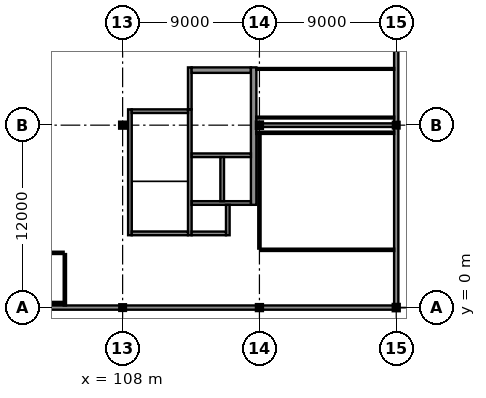
"""IFC4 building model, lengths in metres.
Left out: names, types, materials, properties, quantities, classifications, styles, units other than length and angle.
Written with IfcOpenShell. Run it as: python <this file> out.ifc"""

import sys

from ifc_helpers import new_model, si_unit, direction, frame, frame_2d, origin, origin_2d, place, context, subcontext, project, spatial, rectangle, i_section, extrude, element, fill, save


model = new_model("IFC4")
c1 = context("Model", 3, precision=1e-05, world=origin(), true_north=direction((0.0, 1.0)))
c2 = subcontext(c1, "Body", "Model", "MODEL_VIEW")
j1 = project(units=[si_unit("LENGTHUNIT", "METRE"), si_unit("PLANEANGLEUNIT", "RADIAN")], contexts=[c1])
p1 = place(None, origin())
s1 = spatial("IfcSite", under=j1, at=p1, CompositionType="ELEMENT")
p2 = place(p1, origin())
s2 = spatial("IfcBuilding", under=s1, at=p2, CompositionType="ELEMENT")
p3 = place(p2, frame((0.0, 0.0, 27.4)))
s3 = spatial("IfcBuildingStorey", under=s2, at=p3, CompositionType="ELEMENT", Elevation=27.4)
p4 = place(p3, frame((108.0, 0.0, 0.0), z_axis=(0.0, 0.0, 1.0), x_axis=(1.0, 0.0, 0.0)))
e1 = element("IfcColumn", 1, at=p4, inside=s3, PredefinedType="COLUMN", context=c2, shape_type="SweptSolid", body=[
    extrude(i_section(OverallWidth=0.28, OverallDepth=0.28, WebThickness=0.01, FlangeThickness=0.018, at=origin_2d()), origin(), (0.0, 0.0, 1.0), 4.0),
])
for number, where, z_axis, x_axis in (
    (2, (108.0, 12.0, 0.0), (0.0, 0.0, 1.0), (1.0, 0.0, 0.0)),
    (3, (117.0, 0.0, 0.0), (0.0, 0.0, 1.0), (1.0, 0.0, 0.0)),
):
    element("IfcColumn", number, at=place(p3, frame(where, z_axis=z_axis, x_axis=x_axis)), inside=s3, PredefinedType="COLUMN", context=c2, shape_type="SweptSolid", body=[
        extrude(i_section(OverallWidth=0.3, OverallDepth=0.3, WebThickness=0.011, FlangeThickness=0.019, at=origin_2d()), origin(), (0.0, 0.0, 1.0), 4.0),
    ])
for number, where, z_axis, x_axis in (
    (4, (117.0, 12.0, 0.0), (0.0, 0.0, 1.0), (0.0, 1.0, 0.0)),
    (5, (126.0, 0.0, 0.0), (0.0, 0.0, 1.0), (1.0, 0.0, 0.0)),
):
    element("IfcColumn", number, at=place(p3, frame(where, z_axis=z_axis, x_axis=x_axis)), inside=s3, PredefinedType="COLUMN", context=c2, shape_type="SweptSolid", body=[
        extrude(i_section(OverallWidth=0.3, OverallDepth=0.32, WebThickness=0.011, FlangeThickness=0.021, at=origin_2d()), origin(), (0.0, 0.0, 1.0), 4.0),
    ])
p5 = place(p3, frame((126.0, 12.0, 0.0), z_axis=(0.0, 0.0, 1.0), x_axis=(1.0, 0.0, 0.0)))
e6 = element("IfcColumn", 6, at=p5, inside=s3, PredefinedType="COLUMN", context=c2, shape_type="SweptSolid", body=[
    extrude(i_section(OverallWidth=0.28, OverallDepth=0.28, WebThickness=0.01, FlangeThickness=0.018, at=origin_2d()), origin(), (0.0, 0.0, 1.0), 4.0),
])
p6 = place(p3, frame((99.058, 0.0, 0.0), z_axis=(0.0, 0.0, 1.0), x_axis=(1.0, 0.0, 0.0)))
e7 = element("IfcWall", 7, at=p6, inside=s3, PredefinedType="SOLIDWALL", context=c2, shape_type="SweptSolid", body=[
    extrude(rectangle(XDim=8.934, YDim=0.28, at=frame_2d((4.467, 0.0))), origin(), (0.0, 0.0, 1.0), 2.885),
])
p7 = place(p6, frame((2.03, 0.0, 1.05)))
e8 = element("IfcOpeningElement", 8, at=p7, cuts=e7, PredefinedType="OPENING", context=c2, shape_type="SweptSolid", body=[
    extrude(rectangle(XDim=1.3, YDim=1.3, at=frame_2d((0.65, 0.65))), frame((0.0, 0.155, 0.0), z_axis=(0.0, -1.0, 0.0), x_axis=(1.0, 0.0, 0.0)), (0.0, 0.0, 1.0), 0.31),
])
p8 = place(p6, frame((5.604, 0.0, 1.05)))
e9 = element("IfcOpeningElement", 9, at=p8, cuts=e7, PredefinedType="OPENING", context=c2, shape_type="SweptSolid", body=[
    extrude(rectangle(XDim=1.3, YDim=1.3, at=frame_2d((0.65, 0.65))), frame((0.0, 0.155, 0.0), z_axis=(0.0, -1.0, 0.0), x_axis=(1.0, 0.0, 0.0)), (0.0, 0.0, 1.0), 0.31),
])
p9 = place(p3, frame((108.008, 0.0, 0.0), z_axis=(0.0, 0.0, 1.0), x_axis=(1.0, 0.0, 0.0)))
e10 = element("IfcWall", 10, at=p9, inside=s3, PredefinedType="SOLIDWALL", context=c2, shape_type="SweptSolid", body=[
    extrude(rectangle(XDim=8.984, YDim=0.28, at=frame_2d((4.492, 0.0))), origin(), (0.0, 0.0, 1.0), 2.885),
])
p10 = place(p9, frame((2.045, 0.0, 1.05)))
e11 = element("IfcOpeningElement", 11, at=p10, cuts=e10, PredefinedType="OPENING", context=c2, shape_type="SweptSolid", body=[
    extrude(rectangle(XDim=1.3, YDim=1.3, at=frame_2d((0.65, 0.65))), frame((0.0, 0.155, 0.0), z_axis=(0.0, -1.0, 0.0), x_axis=(1.0, 0.0, 0.0)), (0.0, 0.0, 1.0), 0.31),
])
p11 = place(p9, frame((5.639, 0.0, 1.05)))
e12 = element("IfcOpeningElement", 12, at=p11, cuts=e10, PredefinedType="OPENING", context=c2, shape_type="SweptSolid", body=[
    extrude(rectangle(XDim=1.3, YDim=1.3, at=frame_2d((0.65, 0.65))), frame((0.0, 0.155, 0.0), z_axis=(0.0, -1.0, 0.0), x_axis=(1.0, 0.0, 0.0)), (0.0, 0.0, 1.0), 0.31),
])
p12 = place(p3, frame((117.008, 0.0, 0.0), z_axis=(0.0, 0.0, 1.0), x_axis=(1.0, 0.0, 0.0)))
e13 = element("IfcWall", 13, at=p12, inside=s3, PredefinedType="SOLIDWALL", context=c2, shape_type="SweptSolid", body=[
    extrude(rectangle(XDim=8.984, YDim=0.28, at=frame_2d((4.492, 0.0))), origin(), (0.0, 0.0, 1.0), 2.885),
])
p13 = place(p12, frame((2.045, 0.0, 1.05)))
e14 = element("IfcOpeningElement", 14, at=p13, cuts=e13, PredefinedType="OPENING", context=c2, shape_type="SweptSolid", body=[
    extrude(rectangle(XDim=1.3, YDim=1.3, at=frame_2d((0.65, 0.65))), frame((0.0, 0.155, 0.0), z_axis=(0.0, -1.0, 0.0), x_axis=(1.0, 0.0, 0.0)), (0.0, 0.0, 1.0), 0.31),
])
p14 = place(p12, frame((5.639, 0.0, 1.05)))
e15 = element("IfcOpeningElement", 15, at=p14, cuts=e13, PredefinedType="OPENING", context=c2, shape_type="SweptSolid", body=[
    extrude(rectangle(XDim=1.3, YDim=1.3, at=frame_2d((0.65, 0.65))), frame((0.0, 0.155, 0.0), z_axis=(0.0, -1.0, 0.0), x_axis=(1.0, 0.0, 0.0)), (0.0, 0.0, 1.0), 0.31),
])
p15 = place(p3, frame((126.0, 0.158, 0.0), z_axis=(0.0, 0.0, 1.0), x_axis=(0.0, 1.0, 0.0)))
e16 = element("IfcWall", 16, at=p15, inside=s3, PredefinedType="SOLIDWALL", context=c2, shape_type="SweptSolid", body=[
    extrude(rectangle(XDim=11.704, YDim=0.28, at=frame_2d((5.852, 0.0))), origin(), (0.0, 0.0, 1.0), 3.305),
])
p16 = place(p15, frame((6.842, 0.0, 0.0)))
e17 = element("IfcOpeningElement", 17, at=p16, cuts=e16, PredefinedType="OPENING", context=c2, shape_type="SweptSolid", body=[
    extrude(rectangle(XDim=1.2, YDim=2.3, at=frame_2d((0.6, 1.15))), frame((0.0, 0.155, 0.0), z_axis=(0.0, -1.0, 0.0), x_axis=(1.0, 0.0, 0.0)), (0.0, 0.0, 1.0), 0.31),
])
p17 = place(p3, frame((126.0, 12.138, 0.0), z_axis=(0.0, 0.0, 1.0), x_axis=(0.0, 1.0, 0.0)))
e18 = element("IfcWall", 18, at=p17, inside=s3, PredefinedType="SOLIDWALL", context=c2, shape_type="SweptSolid", body=[
    extrude(rectangle(XDim=11.589, YDim=0.28, at=frame_2d((5.794, 0.0))), origin(), (0.0, 0.0, 1.0), 3.305),
])
p18 = place(p17, frame((2.022, 0.0, 1.05)))
e19 = element("IfcOpeningElement", 19, at=p18, cuts=e18, PredefinedType="OPENING", context=c2, shape_type="SweptSolid", body=[
    extrude(rectangle(XDim=1.3, YDim=1.3, at=frame_2d((0.65, 0.65))), frame((0.0, 0.155, 0.0), z_axis=(0.0, -1.0, 0.0), x_axis=(1.0, 0.0, 0.0)), (0.0, 0.0, 1.0), 0.31),
])
p19 = place(p17, frame((7.462, 0.0, 1.05)))
e20 = element("IfcOpeningElement", 20, at=p19, cuts=e18, PredefinedType="OPENING", context=c2, shape_type="SweptSolid", body=[
    extrude(rectangle(XDim=1.3, YDim=1.3, at=frame_2d((0.65, 0.65))), frame((0.0, 0.155, 0.0), z_axis=(0.0, -1.0, 0.0), x_axis=(1.0, 0.0, 0.0)), (0.0, 0.0, 1.0), 0.31),
])
p20 = place(p3, frame((108.48, 4.76, 0.0), z_axis=(0.0, 0.0, 1.0), x_axis=(0.0, 1.0, 0.0)))
e21 = element("IfcWall", 21, at=p20, inside=s3, PredefinedType="SHEAR", context=c2, shape_type="SweptSolid", body=[
    extrude(rectangle(XDim=8.28, YDim=0.24, at=frame_2d((4.14, 0.0))), origin(), (0.0, 0.0, 1.0), 3.81),
])
p21 = place(p3, frame((112.42, 4.76, 0.0), z_axis=(0.0, 0.0, 1.0), x_axis=(0.0, 1.0, 0.0)))
e22 = element("IfcWall", 22, at=p21, inside=s3, PredefinedType="SHEAR", context=c2, shape_type="SweptSolid", body=[
    extrude(rectangle(XDim=8.28, YDim=0.24, at=frame_2d((4.14, 0.0))), origin(), (0.0, 0.0, 1.0), 3.81),
])
p22 = place(p21, frame((6.49, 0.0, 0.0)))
e23 = element("IfcOpeningElement", 23, at=p22, cuts=e22, PredefinedType="OPENING", context=c2, shape_type="SweptSolid", body=[
    extrude(rectangle(XDim=1.3, YDim=2.2, at=frame_2d((0.65, 1.1))), frame((0.0, 0.135, 0.0), z_axis=(0.0, -1.0, 0.0), x_axis=(1.0, 0.0, 0.0)), (0.0, 0.0, 1.0), 0.27),
])
for number, where, z_axis, x_axis in (
    (24, (108.6, 4.88, 0.0), (0.0, 0.0, 1.0), (1.0, 0.0, 0.0)),
    (25, (108.6, 12.92, 0.0), (0.0, 0.0, 1.0), (1.0, 0.0, 0.0)),
):
    element("IfcWall", number, at=place(p3, frame(where, z_axis=z_axis, x_axis=x_axis)), inside=s3, PredefinedType="SHEAR", context=c2, shape_type="SweptSolid", body=[
        extrude(rectangle(XDim=3.7, YDim=0.24, at=frame_2d((1.85, 0.0))), origin(), (0.0, 0.0, 1.0), 3.81),
    ])
p23 = place(p3, frame((112.42, 13.04, 0.0), z_axis=(0.0, 0.0, 1.0), x_axis=(0.0, 1.0, 0.0)))
e26 = element("IfcWall", 26, at=p23, inside=s3, PredefinedType="SHEAR", context=c2, shape_type="SweptSolid", body=[
    extrude(rectangle(XDim=2.76, YDim=0.24, at=frame_2d((1.38, 0.0))), origin(), (0.0, 0.0, 1.0), 3.66),
])
p24 = place(p3, frame((112.54, 15.62, 0.0), z_axis=(0.0, 0.0, 1.0), x_axis=(1.0, 0.0, 0.0)))
e27 = element("IfcWall", 27, at=p24, inside=s3, PredefinedType="SHEAR", context=c2, shape_type="SweptSolid", body=[
    extrude(rectangle(XDim=3.9, YDim=0.36, at=frame_2d((1.95, 0.0))), origin(), (0.0, 0.0, 1.0), 3.66),
])
p25 = place(p24, frame((1.15, 0.0, 0.0)))
e28 = element("IfcOpeningElement", 28, at=p25, cuts=e27, PredefinedType="OPENING", context=c2, shape_type="SweptSolid", body=[
    extrude(rectangle(XDim=1.6, YDim=2.25, at=frame_2d((0.8, 1.125))), frame((0.0, 0.195, 0.0), z_axis=(0.0, -1.0, 0.0), x_axis=(1.0, 0.0, 0.0)), (0.0, 0.0, 1.0), 0.39),
])
p26 = place(p3, frame((116.62, 6.76, 0.0), z_axis=(0.0, 0.0, 1.0), x_axis=(0.0, 1.0, 0.0)))
e29 = element("IfcWall", 29, at=p26, inside=s3, PredefinedType="SHEAR", context=c2, shape_type="SweptSolid", body=[
    extrude(rectangle(XDim=9.04, YDim=0.36, at=frame_2d((4.52, 0.0))), origin(), (0.0, 0.0, 1.0), 3.66),
])
p27 = place(p3, frame((112.54, 10.02, 0.0), z_axis=(0.0, 0.0, 1.0), x_axis=(1.0, 0.0, 0.0)))
e30 = element("IfcWall", 30, at=p27, inside=s3, PredefinedType="SHEAR", context=c2, shape_type="SweptSolid", body=[
    extrude(rectangle(XDim=3.9, YDim=0.24, at=frame_2d((1.95, 0.0))), origin(), (0.0, 0.0, 1.0), 3.81),
])
p28 = place(p27, frame((0.235, 0.0, 0.0)))
e31 = element("IfcOpeningElement", 31, at=p28, cuts=e30, PredefinedType="OPENING", context=c2, shape_type="SweptSolid", body=[
    extrude(rectangle(XDim=1.6, YDim=2.3, at=frame_2d((0.8, 1.15))), frame((0.0, 0.135, 0.0), z_axis=(0.0, -1.0, 0.0), x_axis=(1.0, 0.0, 0.0)), (0.0, 0.0, 1.0), 0.27),
])
p29 = place(p27, frame((2.185, 0.0, 0.0)))
e32 = element("IfcOpeningElement", 32, at=p29, cuts=e30, PredefinedType="OPENING", context=c2, shape_type="SweptSolid", body=[
    extrude(rectangle(XDim=1.6, YDim=2.3, at=frame_2d((0.8, 1.15))), frame((0.0, 0.135, 0.0), z_axis=(0.0, -1.0, 0.0), x_axis=(1.0, 0.0, 0.0)), (0.0, 0.0, 1.0), 0.27),
])
p30 = place(p3, frame((112.54, 6.88, 0.0), z_axis=(0.0, 0.0, 1.0), x_axis=(1.0, 0.0, 0.0)))
e33 = element("IfcWall", 33, at=p30, inside=s3, PredefinedType="SHEAR", context=c2, shape_type="SweptSolid", body=[
    extrude(rectangle(XDim=3.9, YDim=0.24, at=frame_2d((1.95, 0.0))), origin(), (0.0, 0.0, 1.0), 3.81),
])
p31 = place(p3, frame((114.55, 7.0, 0.0), z_axis=(0.0, 0.0, 1.0), x_axis=(0.0, 1.0, 0.0)))
e34 = element("IfcWall", 34, at=p31, inside=s3, PredefinedType="SHEAR", context=c2, shape_type="SweptSolid", body=[
    extrude(rectangle(XDim=2.9, YDim=0.24, at=frame_2d((1.45, 0.0))), origin(), (0.0, 0.0, 1.0), 3.81),
])
p32 = place(p3, frame((114.92, 4.76, 0.0), z_axis=(0.0, 0.0, 1.0), x_axis=(0.0, 1.0, 0.0)))
e35 = element("IfcWall", 35, at=p32, inside=s3, PredefinedType="SHEAR", context=c2, shape_type="SweptSolid", body=[
    extrude(rectangle(XDim=2.0, YDim=0.24, at=frame_2d((1.0, 0.0))), origin(), (0.0, 0.0, 1.0), 3.81),
])
p33 = place(p3, frame((112.54, 4.88, 0.0), z_axis=(0.0, 0.0, 1.0), x_axis=(1.0, 0.0, 0.0)))
e36 = element("IfcWall", 36, at=p33, inside=s3, PredefinedType="SHEAR", context=c2, shape_type="SweptSolid", body=[
    extrude(rectangle(XDim=2.26, YDim=0.24, at=frame_2d((1.13, 0.0))), origin(), (0.0, 0.0, 1.0), 3.81),
])
p34 = place(p3, frame((117.158, 12.0, 0.0), z_axis=(0.0, 0.0, 1.0), x_axis=(1.0, 0.0, 0.0)))
e37 = element("IfcWall", 37, at=p34, inside=s3, PredefinedType="SHEAR", context=c2, shape_type="SweptSolid", body=[
    extrude(rectangle(XDim=8.834, YDim=0.24, at=frame_2d((4.417, 0.0))), origin(), (0.0, 0.0, 1.0), 3.355),
])
p35 = place(p3, frame((45.88, 3.6, 0.0), z_axis=(0.0, 0.0, 1.0), x_axis=(1.0, 0.0, 0.0)))
e38 = element("IfcWall", 38, at=p35, inside=s3, PredefinedType="PARTITIONING", context=c2, shape_type="SweptSolid", body=[
    extrude(rectangle(XDim=58.24, YDim=0.15, at=frame_2d((29.12, 0.0))), origin(), (0.0, 0.0, 1.0), 3.64),
])
p36 = place(p35, frame((27.795, 0.0, 0.0)))
e39 = element("IfcOpeningElement", 39, at=p36, cuts=e38, PredefinedType="OPENING", context=c2, shape_type="SweptSolid", body=[
    extrude(rectangle(XDim=1.05, YDim=2.25, at=frame_2d((0.525, 1.125))), frame((0.0, 0.09, 0.0), z_axis=(0.0, -1.0, 0.0), x_axis=(1.0, 0.0, 0.0)), (0.0, 0.0, 1.0), 0.18),
])
p37 = place(p3, frame((104.2, 3.52, 0.0), z_axis=(0.0, 0.0, 1.0), x_axis=(0.0, -1.0, 0.0)))
e40 = element("IfcWall", 40, at=p37, inside=s3, PredefinedType="PARTITIONING", context=c2, shape_type="SweptSolid", body=[
    extrude(rectangle(XDim=3.385, YDim=0.15, at=frame_2d((1.692, 0.0))), origin(), (0.0, 0.0, 1.0), 3.64),
])
p38 = place(p3, frame((104.13, 0.3, 0.0), z_axis=(0.0, 0.0, 1.0), x_axis=(-1.0, 0.0, 0.0)))
e41 = element("IfcWall", 41, at=p38, inside=s3, PredefinedType="PARTITIONING", context=c2, shape_type="SweptSolid", body=[
    extrude(rectangle(XDim=31.851, YDim=0.15, at=frame_2d((15.925, 0.0))), origin(), (0.0, 0.0, 1.0), 3.64),
])
p39 = place(p3, frame((125.865, 3.8, 0.0), z_axis=(0.0, 0.0, 1.0), x_axis=(-1.0, 0.0, 0.0)))
e42 = element("IfcWall", 42, at=p39, inside=s3, PredefinedType="PARTITIONING", context=c2, shape_type="SweptSolid", body=[
    extrude(rectangle(XDim=8.785, YDim=0.15, at=frame_2d((4.393, 0.0))), origin(), (0.0, 0.0, 1.0), 3.64),
])
p40 = place(p39, frame((3.867, 0.0, 0.0)))
e43 = element("IfcOpeningElement", 43, at=p40, cuts=e42, PredefinedType="OPENING", context=c2, shape_type="SweptSolid", body=[
    extrude(rectangle(XDim=1.05, YDim=2.25, at=frame_2d((0.525, 1.125))), frame((0.0, 0.09, 0.0), z_axis=(0.0, -1.0, 0.0), x_axis=(1.0, 0.0, 0.0)), (0.0, 0.0, 1.0), 0.18),
])
p41 = place(p3, frame((117.0, 3.88, 0.0), z_axis=(0.0, 0.0, 1.0), x_axis=(0.0, 1.0, 0.0)))
e44 = element("IfcWall", 44, at=p41, inside=s3, PredefinedType="PARTITIONING", context=c2, shape_type="SweptSolid", body=[
    extrude(rectangle(XDim=7.54, YDim=0.15, at=frame_2d((3.77, 0.0))), origin(), (0.0, 0.0, 1.0), 3.355),
])
p42 = place(p3, frame((116.795, 11.5, 0.0), z_axis=(0.0, 0.0, 1.0), x_axis=(1.0, 0.0, 0.0)))
e45 = element("IfcWall", 45, at=p42, inside=s3, PredefinedType="PARTITIONING", context=c2, shape_type="SweptSolid", body=[
    extrude(rectangle(XDim=9.07, YDim=0.15, at=frame_2d((4.535, 0.0))), origin(), (0.0, 0.0, 1.0), 3.64),
])
p43 = place(p3, frame((125.865, 12.5, 0.0), z_axis=(0.0, 0.0, 1.0), x_axis=(-1.0, 0.0, 0.0)))
e46 = element("IfcWall", 46, at=p43, inside=s3, PredefinedType="PARTITIONING", context=c2, shape_type="SweptSolid", body=[
    extrude(rectangle(XDim=9.07, YDim=0.12, at=frame_2d((4.535, 0.0))), origin(), (0.0, 0.0, 1.0), 3.64),
])
p44 = place(p3, frame((116.795, 15.7, 0.0), z_axis=(0.0, 0.0, 1.0), x_axis=(1.0, 0.0, 0.0)))
e47 = element("IfcWall", 47, at=p44, inside=s3, PredefinedType="PARTITIONING", context=c2, shape_type="SweptSolid", body=[
    extrude(rectangle(XDim=9.07, YDim=0.12, at=frame_2d((4.535, 0.0))), origin(), (0.0, 0.0, 1.0), 3.64),
])
p45 = place(p44, frame((4.06, 0.0, 0.0)))
e48 = element("IfcOpeningElement", 48, at=p45, cuts=e47, PredefinedType="OPENING", context=c2, shape_type="SweptSolid", body=[
    extrude(rectangle(XDim=0.95, YDim=2.15, at=frame_2d((0.475, 1.075))), frame((0.0, 0.075, 0.0), z_axis=(0.0, -1.0, 0.0), x_axis=(1.0, 0.0, 0.0)), (0.0, 0.0, 1.0), 0.15),
])
p46 = place(p16, frame((1.2, 0.0, 0.0), z_axis=(0.0, 0.0, 1.0), x_axis=(-1.0, 0.0, 0.0)))
e49 = element("IfcDoor", 49, at=p46, inside=s3, OperationType="SINGLE_SWING_LEFT", PredefinedType="DOOR", context=c2, shape_type="SweptSolid", body=[
    extrude(rectangle(XDim=1.2, YDim=2.3, at=frame_2d((0.6, 1.15))), frame((0.0, 0.025, 0.0), z_axis=(0.0, -1.0, 0.0), x_axis=(1.0, 0.0, 0.0)), (0.0, 0.0, 1.0), 0.05),
])
fill(e17, e49)
p47 = place(p8, origin())
e50 = element("IfcWindow", 50, at=p47, inside=s3, PartitioningType="SINGLE_PANEL", PredefinedType="WINDOW", context=c2, shape_type="SweptSolid", body=[
    extrude(rectangle(XDim=1.3, YDim=1.3, at=frame_2d((0.65, 0.65))), frame((0.0, 0.03, 0.0), z_axis=(0.0, -1.0, 0.0), x_axis=(1.0, 0.0, 0.0)), (0.0, 0.0, 1.0), 0.06),
])
fill(e9, e50)
p48 = place(p10, origin())
e51 = element("IfcWindow", 51, at=p48, inside=s3, PartitioningType="SINGLE_PANEL", PredefinedType="WINDOW", context=c2, shape_type="SweptSolid", body=[
    extrude(rectangle(XDim=1.3, YDim=1.3, at=frame_2d((0.65, 0.65))), frame((0.0, 0.03, 0.0), z_axis=(0.0, -1.0, 0.0), x_axis=(1.0, 0.0, 0.0)), (0.0, 0.0, 1.0), 0.06),
])
fill(e11, e51)
p49 = place(p11, origin())
e52 = element("IfcWindow", 52, at=p49, inside=s3, PartitioningType="SINGLE_PANEL", PredefinedType="WINDOW", context=c2, shape_type="SweptSolid", body=[
    extrude(rectangle(XDim=1.3, YDim=1.3, at=frame_2d((0.65, 0.65))), frame((0.0, 0.03, 0.0), z_axis=(0.0, -1.0, 0.0), x_axis=(1.0, 0.0, 0.0)), (0.0, 0.0, 1.0), 0.06),
])
fill(e12, e52)
p50 = place(p13, origin())
e53 = element("IfcWindow", 53, at=p50, inside=s3, PartitioningType="SINGLE_PANEL", PredefinedType="WINDOW", context=c2, shape_type="SweptSolid", body=[
    extrude(rectangle(XDim=1.3, YDim=1.3, at=frame_2d((0.65, 0.65))), frame((0.0, 0.03, 0.0), z_axis=(0.0, -1.0, 0.0), x_axis=(1.0, 0.0, 0.0)), (0.0, 0.0, 1.0), 0.06),
])
fill(e14, e53)
p51 = place(p14, origin())
e54 = element("IfcWindow", 54, at=p51, inside=s3, PartitioningType="SINGLE_PANEL", PredefinedType="WINDOW", context=c2, shape_type="SweptSolid", body=[
    extrude(rectangle(XDim=1.3, YDim=1.3, at=frame_2d((0.65, 0.65))), frame((0.0, 0.03, 0.0), z_axis=(0.0, -1.0, 0.0), x_axis=(1.0, 0.0, 0.0)), (0.0, 0.0, 1.0), 0.06),
])
fill(e15, e54)
p52 = place(p18, origin())
e55 = element("IfcWindow", 55, at=p52, inside=s3, PartitioningType="SINGLE_PANEL", PredefinedType="WINDOW", context=c2, shape_type="SweptSolid", body=[
    extrude(rectangle(XDim=1.3, YDim=1.3, at=frame_2d((0.65, 0.65))), frame((0.0, 0.03, 0.0), z_axis=(0.0, -1.0, 0.0), x_axis=(1.0, 0.0, 0.0)), (0.0, 0.0, 1.0), 0.06),
])
fill(e19, e55)
p53 = place(p22, frame((1.3, 0.0, 0.0), z_axis=(0.0, 0.0, 1.0), x_axis=(-1.0, 0.0, 0.0)))
e56 = element("IfcDoor", 56, at=p53, inside=s3, OperationType="SINGLE_SWING_RIGHT", PredefinedType="DOOR", context=c2, shape_type="SweptSolid", body=[
    extrude(rectangle(XDim=1.3, YDim=2.2, at=frame_2d((0.65, 1.1))), frame((0.0, 0.025, 0.0), z_axis=(0.0, -1.0, 0.0), x_axis=(1.0, 0.0, 0.0)), (0.0, 0.0, 1.0), 0.05),
])
fill(e23, e56)
p54 = place(p25, origin())
e57 = element("IfcDoor", 57, at=p54, inside=s3, OperationType="DOUBLE_DOOR_SINGLE_SWING", PredefinedType="DOOR", context=c2, shape_type="SweptSolid", body=[
    extrude(rectangle(XDim=1.6, YDim=2.25, at=frame_2d((0.8, 1.125))), frame((0.0, 0.025, 0.0), z_axis=(0.0, -1.0, 0.0), x_axis=(1.0, 0.0, 0.0)), (0.0, 0.0, 1.0), 0.05),
])
fill(e28, e57)
p55 = place(p28, origin())
e58 = element("IfcDoor", 58, at=p55, inside=s3, OperationType="DOUBLE_DOOR_SLIDING", PredefinedType="DOOR", context=c2, shape_type="SweptSolid", body=[
    extrude(rectangle(XDim=1.6, YDim=2.3, at=frame_2d((0.8, 1.15))), frame((0.0, 0.025, 0.0), z_axis=(0.0, -1.0, 0.0), x_axis=(1.0, 0.0, 0.0)), (0.0, 0.0, 1.0), 0.05),
])
fill(e31, e58)
p56 = place(p29, origin())
e59 = element("IfcDoor", 59, at=p56, inside=s3, OperationType="DOUBLE_DOOR_SLIDING", PredefinedType="DOOR", context=c2, shape_type="SweptSolid", body=[
    extrude(rectangle(XDim=1.6, YDim=2.3, at=frame_2d((0.8, 1.15))), frame((0.0, 0.025, 0.0), z_axis=(0.0, -1.0, 0.0), x_axis=(1.0, 0.0, 0.0)), (0.0, 0.0, 1.0), 0.05),
])
fill(e32, e59)
p57 = place(p40, origin())
e60 = element("IfcDoor", 60, at=p57, inside=s3, OperationType="SINGLE_SWING_LEFT", PredefinedType="DOOR", context=c2, shape_type="SweptSolid", body=[
    extrude(rectangle(XDim=1.05, YDim=2.25, at=frame_2d((0.525, 1.125))), frame((0.0, 0.025, 0.0), z_axis=(0.0, -1.0, 0.0), x_axis=(1.0, 0.0, 0.0)), (0.0, 0.0, 1.0), 0.05),
])
fill(e43, e60)
p58 = place(p45, frame((0.95, 0.0, 0.0), z_axis=(0.0, 0.0, 1.0), x_axis=(-1.0, 0.0, 0.0)))
e61 = element("IfcDoor", 61, at=p58, inside=s3, OperationType="SINGLE_SWING_RIGHT", PredefinedType="DOOR", context=c2, shape_type="SweptSolid", body=[
    extrude(rectangle(XDim=0.95, YDim=2.15, at=frame_2d((0.475, 1.075))), frame((0.0, 0.025, 0.0), z_axis=(0.0, -1.0, 0.0), x_axis=(1.0, 0.0, 0.0)), (0.0, 0.0, 1.0), 0.05),
])
fill(e48, e61)
save(model, sys.argv[1])
